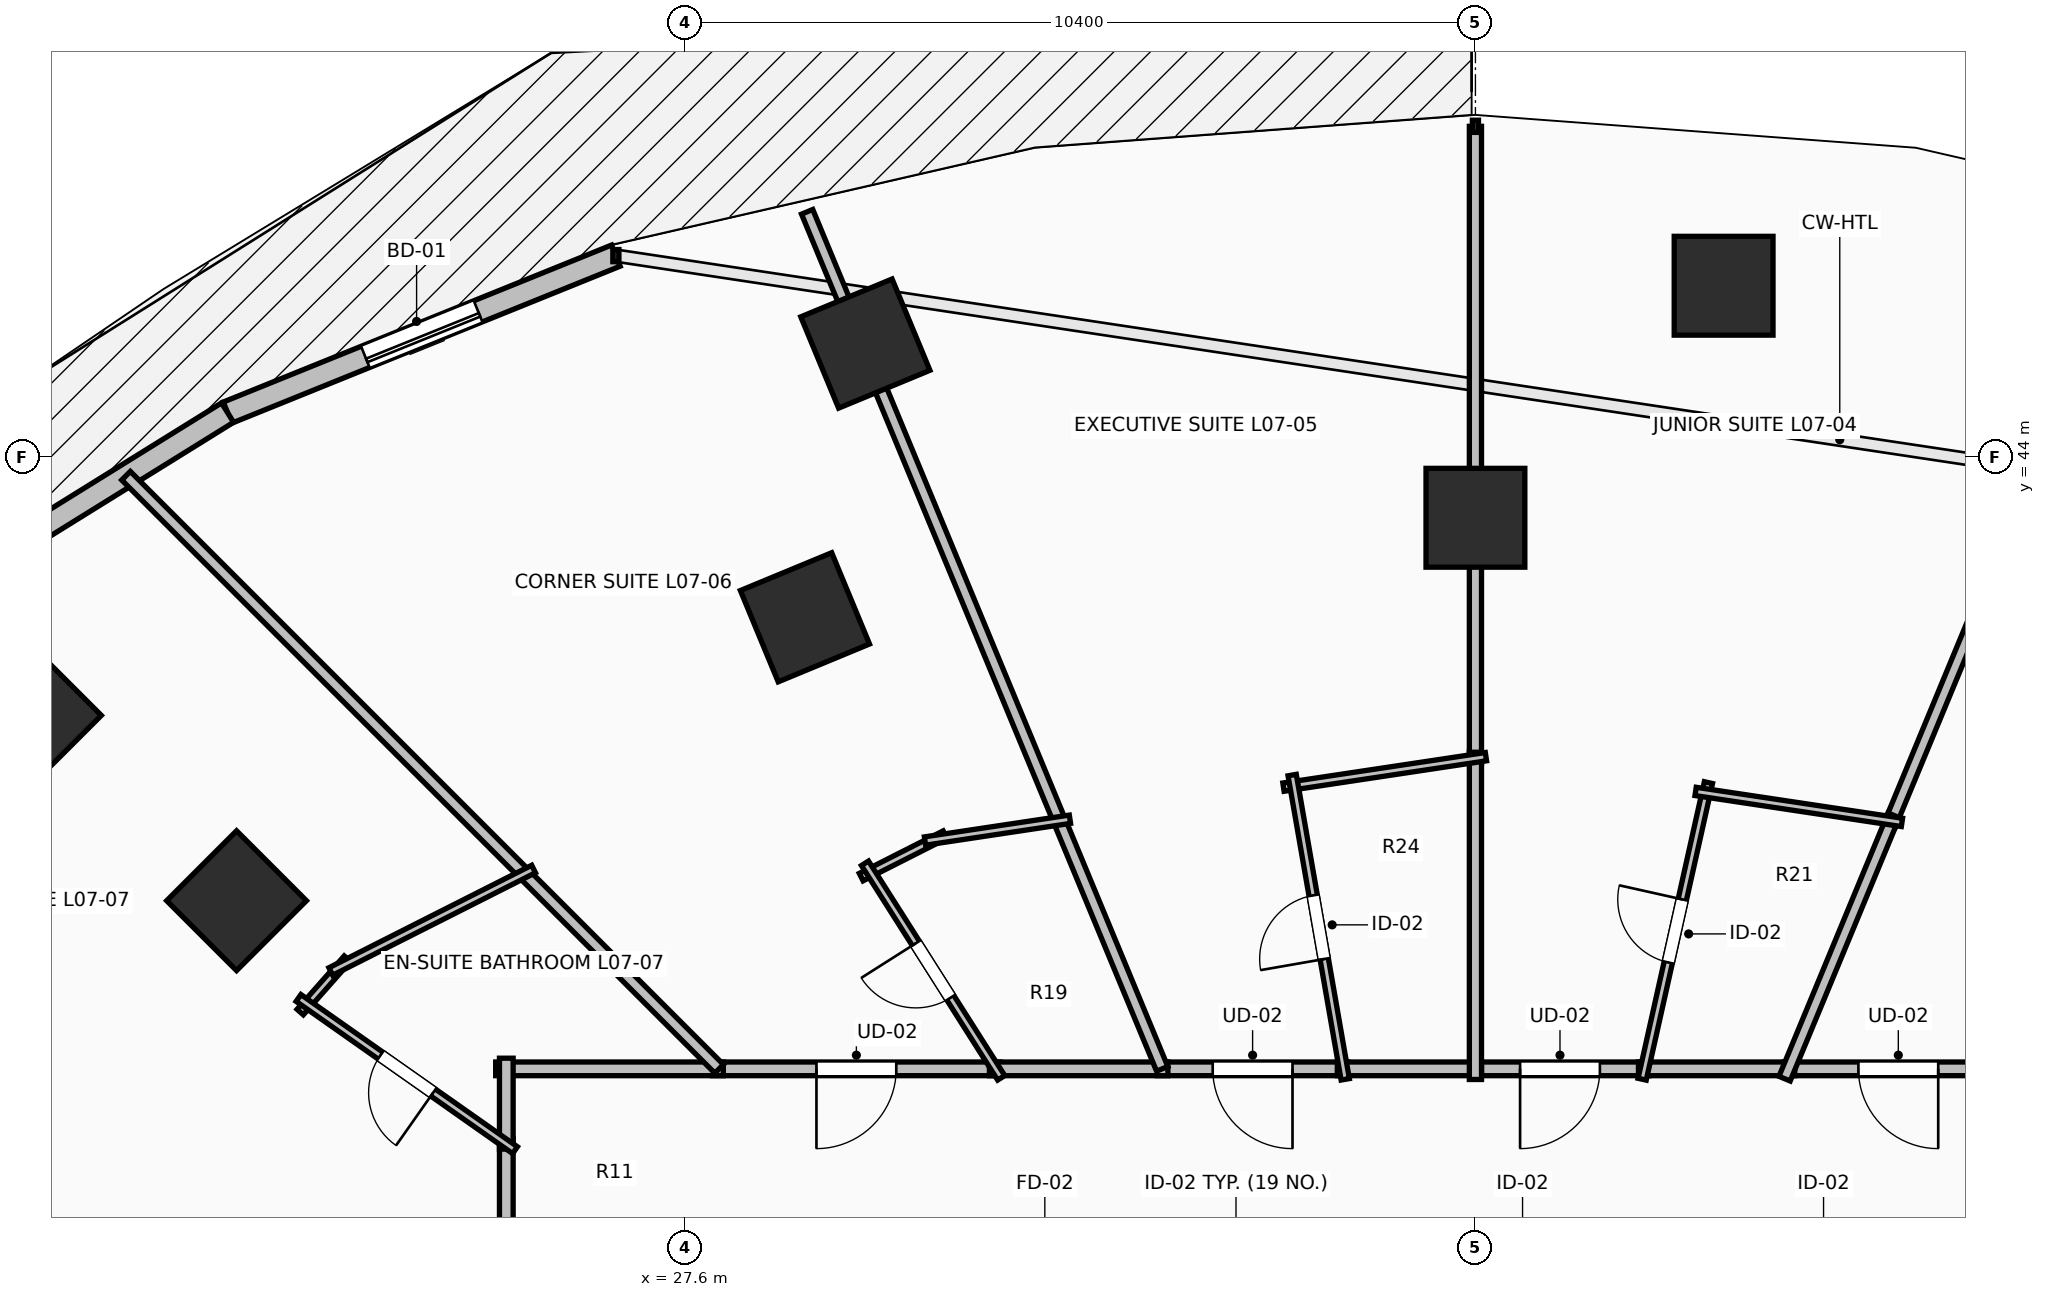
"""IFC4 building model, lengths in metres.
Left out: names, types, materials, properties, quantities, classifications, styles, units other than length and angle.
Written with IfcOpenShell. Run it as: python <this file> out.ifc"""

import sys

from ifc_helpers import new_model, si_unit, direction, frame, frame_2d, origin, origin_2d, place, context, subcontext, project, spatial, rectangle, extrude, element, fill, save


model = new_model("IFC4")
c1 = context("Model", 3, precision=1e-05, world=origin(), true_north=direction((0.0, 1.0)))
c2 = subcontext(c1, "Body", "Model", "MODEL_VIEW")
j1 = project(units=[si_unit("LENGTHUNIT", "METRE"), si_unit("PLANEANGLEUNIT", "RADIAN")], contexts=[c1])
p1 = place(None, origin())
s1 = spatial("IfcSite", under=j1, at=p1, CompositionType="ELEMENT")
p2 = place(p1, origin())
s2 = spatial("IfcBuilding", under=s1, at=p2, CompositionType="ELEMENT")
p3 = place(p2, frame((0.0, 0.0, 31.0)))
s3 = spatial("IfcBuildingStorey", under=s2, at=p3, CompositionType="ELEMENT", Elevation=31.0)
for number, where, z_axis, x_axis in (
    (1, (38.0, 43.2, 0.0), (0.0, 0.0, 1.0), (0.0, 1.0, 0.0)),
    (2, (29.179, 41.891, 0.0), (0.0, 0.0, 1.0), (-0.383, 0.924, 0.0)),
    (3, (21.701, 38.162, 0.0), (0.0, 0.0, 1.0), (-0.707, 0.707, 0.0)),
    (4, (41.265, 46.252, 0.0), (0.0, 0.0, 1.0), (0.0, 1.0, 0.0)),
    (5, (29.974, 45.492, 0.0), (0.0, 0.0, 1.0), (-0.383, 0.924, 0.0)),
    (6, (19.003, 40.6, 0.0), (0.0, 0.0, 1.0), (-0.707, 0.707, 0.0)),
):
    element("IfcColumn", number, at=place(p3, frame(where, z_axis=z_axis, x_axis=x_axis)), inside=s3, PredefinedType="COLUMN", context=c2, shape_type="SweptSolid", body=[
        extrude(rectangle(XDim=1.3, YDim=1.3, at=origin_2d()), origin(), (0.0, 0.0, 1.0), 3.5),
    ])
p4 = place(p3, frame((26.692, 46.649, 0.0), z_axis=(0.0, 0.0, 1.0), x_axis=(-0.927095325176, -0.374825636845, 0.0)))
e7 = element("IfcWall", 7, at=p4, inside=s3, PredefinedType="STANDARD", context=c2, shape_type="SweptSolid", body=[
    extrude(rectangle(XDim=5.51, YDim=0.3, at=frame_2d((2.755, 0.0))), origin(), (0.0, 0.0, 1.0), 3.24),
])
p5 = place(p4, frame((1.955, 0.0, 0.0)))
e8 = element("IfcOpeningElement", 8, at=p5, cuts=e7, PredefinedType="OPENING", context=c2, shape_type="SweptSolid", body=[
    extrude(rectangle(XDim=1.6, YDim=2.3, at=frame_2d((0.8, 1.15))), frame((0.0, 0.165, 0.0), z_axis=(0.0, -1.0, 0.0), x_axis=(1.0, 0.0, 0.0)), (0.0, 0.0, 1.0), 0.33),
])
p6 = place(p3, frame((21.583, 44.583, 0.0), z_axis=(0.0, 0.0, 1.0), x_axis=(-0.849633724826, -0.527373239404, 0.0)))
e9 = element("IfcWall", 9, at=p6, inside=s3, PredefinedType="STANDARD", context=c2, shape_type="SweptSolid", body=[
    extrude(rectangle(XDim=5.271, YDim=0.3, at=frame_2d((2.635, 0.0))), origin(), (0.0, 0.0, 1.0), 3.24),
])
p7 = place(p3, frame((45.066, 35.95, 0.0), z_axis=(0.0, 0.0, 1.0), x_axis=(-1.0, 0.0, 0.0)))
e10 = element("IfcWall", 10, at=p7, inside=s3, PredefinedType="PARTITIONING", context=c2, shape_type="SweptSolid", body=[
    extrude(rectangle(XDim=3.005, YDim=0.18, at=frame_2d((1.502, 0.0))), origin(), (0.0, 0.0, 1.0), 3.24),
])
p8 = place(p7, frame((0.978, 0.0, 0.0)))
e11 = element("IfcOpeningElement", 11, at=p8, cuts=e10, PredefinedType="OPENING", context=c2, shape_type="SweptSolid", body=[
    extrude(rectangle(XDim=1.05, YDim=2.2, at=frame_2d((0.525, 1.1))), frame((0.0, 0.105, 0.0), z_axis=(0.0, -1.0, 0.0), x_axis=(1.0, 0.0, 0.0)), (0.0, 0.0, 1.0), 0.21),
])
p9 = place(p3, frame((40.285, 35.95, 0.0), z_axis=(0.0, 0.0, 1.0), x_axis=(-1.0, 0.0, 0.0)))
e12 = element("IfcWall", 12, at=p9, inside=s3, PredefinedType="PARTITIONING", context=c2, shape_type="SweptSolid", body=[
    extrude(rectangle(XDim=2.345, YDim=0.18, at=frame_2d((1.172, 0.0))), origin(), (0.0, 0.0, 1.0), 3.24),
])
p10 = place(p9, frame((0.647, 0.0, 0.0)))
e13 = element("IfcOpeningElement", 13, at=p10, cuts=e12, PredefinedType="OPENING", context=c2, shape_type="SweptSolid", body=[
    extrude(rectangle(XDim=1.05, YDim=2.2, at=frame_2d((0.525, 1.1))), frame((0.0, 0.105, 0.0), z_axis=(0.0, -1.0, 0.0), x_axis=(1.0, 0.0, 0.0)), (0.0, 0.0, 1.0), 0.21),
])
p11 = place(p3, frame((42.201, 35.95, 0.0), z_axis=(0.0, 0.0, 1.0), x_axis=(-1.0, 0.0, 0.0)))
e14 = element("IfcWall", 14, at=p11, inside=s3, PredefinedType="PARTITIONING", context=c2, shape_type="SweptSolid", body=[
    extrude(rectangle(XDim=2.056, YDim=0.18, at=frame_2d((1.028, 0.0))), origin(), (0.0, 0.0, 1.0), 3.24),
])
p12 = place(p3, frame((36.323, 35.95, 0.0), z_axis=(0.0, 0.0, 1.0), x_axis=(-1.0, 0.0, 0.0)))
e15 = element("IfcWall", 15, at=p12, inside=s3, PredefinedType="PARTITIONING", context=c2, shape_type="SweptSolid", body=[
    extrude(rectangle(XDim=2.509, YDim=0.18, at=frame_2d((1.254, 0.0))), origin(), (0.0, 0.0, 1.0), 3.24),
])
p13 = place(p12, frame((0.729, 0.0, 0.0)))
e16 = element("IfcOpeningElement", 16, at=p13, cuts=e15, PredefinedType="OPENING", context=c2, shape_type="SweptSolid", body=[
    extrude(rectangle(XDim=1.05, YDim=2.2, at=frame_2d((0.525, 1.1))), frame((0.0, 0.105, 0.0), z_axis=(0.0, -1.0, 0.0), x_axis=(1.0, 0.0, 0.0)), (0.0, 0.0, 1.0), 0.21),
])
p14 = place(p3, frame((38.08, 35.95, 0.0), z_axis=(0.0, 0.0, 1.0), x_axis=(-1.0, 0.0, 0.0)))
e17 = element("IfcWall", 17, at=p14, inside=s3, PredefinedType="PARTITIONING", context=c2, shape_type="SweptSolid", body=[
    extrude(rectangle(XDim=1.897, YDim=0.18, at=frame_2d((0.948, 0.0))), origin(), (0.0, 0.0, 1.0), 3.24),
])
p15 = place(p3, frame((31.746, 35.95, 0.0), z_axis=(0.0, 0.0, 1.0), x_axis=(-1.0, 0.0, 0.0)))
e18 = element("IfcWall", 18, at=p15, inside=s3, PredefinedType="PARTITIONING", context=c2, shape_type="SweptSolid", body=[
    extrude(rectangle(XDim=3.781, YDim=0.18, at=frame_2d((1.891, 0.0))), origin(), (0.0, 0.0, 1.0), 2.432),
])
p16 = place(p15, frame((1.365, 0.0, 0.0)))
e19 = element("IfcOpeningElement", 19, at=p16, cuts=e18, PredefinedType="OPENING", context=c2, shape_type="SweptSolid", body=[
    extrude(rectangle(XDim=1.05, YDim=2.2, at=frame_2d((0.525, 1.1))), frame((0.0, 0.105, 0.0), z_axis=(0.0, -1.0, 0.0), x_axis=(1.0, 0.0, 0.0)), (0.0, 0.0, 1.0), 0.21),
])
p17 = place(p3, frame((33.954, 35.95, 0.0), z_axis=(0.0, 0.0, 1.0), x_axis=(-1.0, 0.0, 0.0)))
e20 = element("IfcWall", 20, at=p17, inside=s3, PredefinedType="PARTITIONING", context=c2, shape_type="SweptSolid", body=[
    extrude(rectangle(XDim=2.348, YDim=0.18, at=frame_2d((1.174, 0.0))), origin(), (0.0, 0.0, 1.0), 3.24),
])
p18 = place(p3, frame((25.25, 35.034, 0.0), z_axis=(0.0, 0.0, 1.0), x_axis=(0.0, -1.0, 0.0)))
e21 = element("IfcWall", 21, at=p18, inside=s3, PredefinedType="PARTITIONING", context=c2, shape_type="SweptSolid", body=[
    extrude(rectangle(XDim=3.813, YDim=0.18, at=frame_2d((1.906, 0.0))), origin(), (0.0, 0.0, 1.0), 2.432),
])
p19 = place(p18, frame((1.382, 0.0, 0.0)))
e22 = element("IfcOpeningElement", 22, at=p19, cuts=e21, PredefinedType="OPENING", context=c2, shape_type="SweptSolid", body=[
    extrude(rectangle(XDim=1.05, YDim=2.2, at=frame_2d((0.525, 1.1))), frame((0.0, 0.105, 0.0), z_axis=(0.0, -1.0, 0.0), x_axis=(1.0, 0.0, 0.0)), (0.0, 0.0, 1.0), 0.21),
])
p20 = place(p3, frame((28.105, 35.95, 0.0), z_axis=(0.0, 0.0, 1.0), x_axis=(-1.0, 0.0, 0.0)))
e23 = element("IfcWall", 23, at=p20, inside=s3, PredefinedType="PARTITIONING", context=c2, shape_type="SweptSolid", body=[
    extrude(rectangle(XDim=2.995, YDim=0.18, at=frame_2d((1.498, 0.0))), origin(), (0.0, 0.0, 1.0), 2.432),
])
p21 = place(p3, frame((25.25, 36.09, 0.0), z_axis=(0.0, 0.0, 1.0), x_axis=(0.0, -1.0, 0.0)))
e24 = element("IfcWall", 24, at=p21, inside=s3, PredefinedType="PARTITIONING", context=c2, shape_type="SweptSolid", body=[
    extrude(rectangle(XDim=1.196, YDim=0.18, at=frame_2d((0.598, 0.0))), origin(), (0.0, 0.0, 1.0), 2.432),
])
p22 = place(p3, frame((46.792, 47.225, 0.0), z_axis=(0.0, 0.0, 1.0), x_axis=(-0.382750893248, -0.923851586413, 0.0)))
e25 = element("IfcWall", 25, at=p22, inside=s3, PredefinedType="PARTITIONING", context=c2, shape_type="SweptSolid", body=[
    extrude(rectangle(XDim=8.734, YDim=0.16, at=frame_2d((4.367, 0.0))), origin(), (0.0, 0.0, 1.0), 2.874),
])
p23 = place(p3, frame((43.503, 39.285, 0.0), z_axis=(0.0, 0.0, 1.0), x_axis=(-0.382867331148, -0.923803337697, 0.0)))
e26 = element("IfcWall", 26, at=p23, inside=s3, PredefinedType="PARTITIONING", context=c2, shape_type="SweptSolid", body=[
    extrude(rectangle(XDim=3.75, YDim=0.16, at=frame_2d((1.875, 0.0))), origin(), (0.0, 0.0, 1.0), 2.922),
])
p24 = place(p3, frame((40.194, 35.813, 0.0), z_axis=(0.0, 0.0, 1.0), x_axis=(0.21804880916, 0.975937865248, 0.0)))
e27 = element("IfcWall", 27, at=p24, inside=s3, PredefinedType="PARTITIONING", context=c2, shape_type="SweptSolid", body=[
    extrude(rectangle(XDim=3.998, YDim=0.11, at=frame_2d((1.999, 0.0))), origin(), (0.0, 0.0, 1.0), 2.922),
])
p25 = place(p24, frame((1.574, 0.0, 0.0)))
e28 = element("IfcOpeningElement", 28, at=p25, cuts=e27, PredefinedType="OPENING", context=c2, shape_type="SweptSolid", body=[
    extrude(rectangle(XDim=0.85, YDim=2.1, at=frame_2d((0.425, 1.05))), frame((0.0, 0.07, 0.0), z_axis=(0.0, -1.0, 0.0), x_axis=(1.0, 0.0, 0.0)), (0.0, 0.0, 1.0), 0.14),
])
p26 = place(p3, frame((40.896, 39.6, 0.0), z_axis=(0.0, 0.0, 1.0), x_axis=(0.98891024541, -0.148514398367, 0.0)))
e29 = element("IfcWall", 29, at=p26, inside=s3, PredefinedType="PARTITIONING", context=c2, shape_type="SweptSolid", body=[
    extrude(rectangle(XDim=2.745, YDim=0.11, at=frame_2d((1.373, 0.0))), origin(), (0.0, 0.0, 1.0), 3.24),
])
p27 = place(p3, frame((38.0, 48.35, 0.0), z_axis=(0.0, 0.0, 1.0), x_axis=(0.0, -1.0, 0.0)))
e30 = element("IfcWall", 30, at=p27, inside=s3, PredefinedType="PARTITIONING", context=c2, shape_type="SweptSolid", body=[
    extrude(rectangle(XDim=8.375, YDim=0.16, at=frame_2d((4.188, 0.0))), origin(), (0.0, 0.0, 1.0), 2.432),
])
p28 = place(p3, frame((38.0, 40.115, 0.0), z_axis=(0.0, 0.0, 1.0), x_axis=(0.0, -1.0, 0.0)))
e31 = element("IfcWall", 31, at=p28, inside=s3, PredefinedType="PARTITIONING", context=c2, shape_type="SweptSolid", body=[
    extrude(rectangle(XDim=4.305, YDim=0.16, at=frame_2d((2.152, 0.0))), origin(), (0.0, 0.0, 1.0), 2.922),
])
p29 = place(p3, frame((35.475, 39.656, 0.0), z_axis=(0.0, 0.0, 1.0), x_axis=(0.988878442063, 0.148726012595, 0.0)))
e32 = element("IfcWall", 32, at=p29, inside=s3, PredefinedType="PARTITIONING", context=c2, shape_type="SweptSolid", body=[
    extrude(rectangle(XDim=2.694, YDim=0.11, at=frame_2d((1.347, 0.0))), origin(), (0.0, 0.0, 1.0), 3.24),
])
p30 = place(p3, frame((36.287, 35.812, 0.0), z_axis=(0.0, 0.0, 1.0), x_axis=(-0.171838135253, 0.985125197766, 0.0)))
e33 = element("IfcWall", 33, at=p30, inside=s3, PredefinedType="PARTITIONING", context=c2, shape_type="SweptSolid", body=[
    extrude(rectangle(XDim=4.063, YDim=0.11, at=frame_2d((2.032, 0.0))), origin(), (0.0, 0.0, 1.0), 2.922),
])
p31 = place(p30, frame((1.607, 0.0, 0.0)))
e34 = element("IfcOpeningElement", 34, at=p31, cuts=e33, PredefinedType="OPENING", context=c2, shape_type="SweptSolid", body=[
    extrude(rectangle(XDim=0.85, YDim=2.1, at=frame_2d((0.425, 1.05))), frame((0.0, 0.07, 0.0), z_axis=(0.0, -1.0, 0.0), x_axis=(1.0, 0.0, 0.0)), (0.0, 0.0, 1.0), 0.14),
])
p32 = place(p3, frame((29.208, 47.225, 0.0), z_axis=(0.0, 0.0, 1.0), x_axis=(0.382723985517, -0.923862733803, 0.0)))
e35 = element("IfcWall", 35, at=p32, inside=s3, PredefinedType="PARTITIONING", context=c2, shape_type="SweptSolid", body=[
    extrude(rectangle(XDim=12.204, YDim=0.16, at=frame_2d((6.102, 0.0))), origin(), (0.0, 0.0, 1.0), 2.432),
])
p33 = place(p3, frame((29.919, 38.473, 0.0), z_axis=(0.0, 0.0, 1.0), x_axis=(0.892084606746, 0.45186840386, 0.0)))
e36 = element("IfcWall", 36, at=p33, inside=s3, PredefinedType="PARTITIONING", context=c2, shape_type="SweptSolid", body=[
    extrude(rectangle(XDim=1.236, YDim=0.11, at=frame_2d((0.618, 0.0))), origin(), (0.0, 0.0, 1.0), 3.24),
])
p34 = place(p3, frame((30.759, 38.947, 0.0), z_axis=(0.0, 0.0, 1.0), x_axis=(0.988889867338, 0.148650026153, 0.0)))
e37 = element("IfcWall", 37, at=p34, inside=s3, PredefinedType="PARTITIONING", context=c2, shape_type="SweptSolid", body=[
    extrude(rectangle(XDim=1.928, YDim=0.11, at=frame_2d((0.964, 0.0))), origin(), (0.0, 0.0, 1.0), 3.24),
])
p35 = place(p3, frame((31.761, 35.832, 0.0), z_axis=(0.0, 0.0, 1.0), x_axis=(-0.535991614842, 0.844223305067, 0.0)))
e38 = element("IfcWall", 38, at=p35, inside=s3, PredefinedType="PARTITIONING", context=c2, shape_type="SweptSolid", body=[
    extrude(rectangle(XDim=3.343, YDim=0.11, at=frame_2d((1.672, 0.0))), origin(), (0.0, 0.0, 1.0), 2.432),
])
p36 = place(p35, frame((1.247, 0.0, 0.0)))
e39 = element("IfcOpeningElement", 39, at=p36, cuts=e38, PredefinedType="OPENING", context=c2, shape_type="SweptSolid", body=[
    extrude(rectangle(XDim=0.85, YDim=2.1, at=frame_2d((0.425, 1.05))), frame((0.0, 0.07, 0.0), z_axis=(0.0, -1.0, 0.0), x_axis=(1.0, 0.0, 0.0)), (0.0, 0.0, 1.0), 0.14),
])
p37 = place(p3, frame((20.247, 43.753, 0.0), z_axis=(0.0, 0.0, 1.0), x_axis=(0.707106781187, -0.707106781187, 0.0)))
e40 = element("IfcWall", 40, at=p37, inside=s3, PredefinedType="PARTITIONING", context=c2, shape_type="SweptSolid", body=[
    extrude(rectangle(XDim=11.035, YDim=0.16, at=frame_2d((5.518, 0.0))), origin(), (0.0, 0.0, 1.0), 2.432),
])
p38 = place(p3, frame((22.538, 36.697, 0.0), z_axis=(0.0, 0.0, 1.0), x_axis=(0.662242037053, 0.749289986827, 0.0)))
e41 = element("IfcWall", 41, at=p38, inside=s3, PredefinedType="PARTITIONING", context=c2, shape_type="SweptSolid", body=[
    extrude(rectangle(XDim=0.937, YDim=0.11, at=frame_2d((0.468, 0.0))), origin(), (0.0, 0.0, 1.0), 2.432),
])
p39 = place(p3, frame((22.941, 37.231, 0.0), z_axis=(0.0, 0.0, 1.0), x_axis=(0.892507731149, 0.451032094024, 0.0)))
e42 = element("IfcWall", 42, at=p39, inside=s3, PredefinedType="PARTITIONING", context=c2, shape_type="SweptSolid", body=[
    extrude(rectangle(XDim=2.989, YDim=0.11, at=frame_2d((1.495, 0.0))), origin(), (0.0, 0.0, 1.0), 2.432),
])
p40 = place(p3, frame((25.365, 34.881, 0.0), z_axis=(0.0, 0.0, 1.0), x_axis=(-0.81809360258, 0.575085087111, 0.0)))
e43 = element("IfcWall", 43, at=p40, inside=s3, PredefinedType="PARTITIONING", context=c2, shape_type="SweptSolid", body=[
    extrude(rectangle(XDim=3.481, YDim=0.11, at=frame_2d((1.741, 0.0))), origin(), (0.0, 0.0, 1.0), 2.432),
])
p41 = place(p40, frame((1.316, 0.0, 0.0)))
e44 = element("IfcOpeningElement", 44, at=p41, cuts=e43, PredefinedType="OPENING", context=c2, shape_type="SweptSolid", body=[
    extrude(rectangle(XDim=0.85, YDim=2.1, at=frame_2d((0.425, 1.05))), frame((0.0, 0.07, 0.0), z_axis=(0.0, -1.0, 0.0), x_axis=(1.0, 0.0, 0.0)), (0.0, 0.0, 1.0), 0.14),
])
p42 = place(p3, frame((12.207, 36.684, 0.0), z_axis=(0.0, 0.0, 1.0), x_axis=(0.923876032578, -0.382691881842, 0.0)))
e45 = element("IfcWall", 45, at=p42, inside=s3, PredefinedType="PARTITIONING", context=c2, shape_type="SweptSolid", body=[
    extrude(rectangle(XDim=10.63, YDim=0.16, at=frame_2d((5.315, 0.0))), origin(), (0.0, 0.0, 1.0), 2.624),
])
p43 = place(p5, origin())
e46 = element("IfcDoor", 46, at=p43, inside=s3, OperationType="SLIDING_TO_LEFT", PredefinedType="DOOR", context=c2, shape_type="SweptSolid", body=[
    extrude(rectangle(XDim=1.6, YDim=2.3, at=frame_2d((0.8, 1.15))), frame((0.0, 0.025, 0.0), z_axis=(0.0, -1.0, 0.0), x_axis=(1.0, 0.0, 0.0)), (0.0, 0.0, 1.0), 0.05),
])
fill(e8, e46)
p44 = place(p8, origin())
e47 = element("IfcDoor", 47, at=p44, inside=s3, OperationType="SINGLE_SWING_LEFT", PredefinedType="DOOR", context=c2, shape_type="SweptSolid", body=[
    extrude(rectangle(XDim=1.05, YDim=2.2, at=frame_2d((0.525, 1.1))), frame((0.0, 0.025, 0.0), z_axis=(0.0, -1.0, 0.0), x_axis=(1.0, 0.0, 0.0)), (0.0, 0.0, 1.0), 0.05),
])
fill(e11, e47)
p45 = place(p10, origin())
e48 = element("IfcDoor", 48, at=p45, inside=s3, OperationType="SINGLE_SWING_RIGHT", PredefinedType="DOOR", context=c2, shape_type="SweptSolid", body=[
    extrude(rectangle(XDim=1.05, YDim=2.2, at=frame_2d((0.525, 1.1))), frame((0.0, 0.025, 0.0), z_axis=(0.0, -1.0, 0.0), x_axis=(1.0, 0.0, 0.0)), (0.0, 0.0, 1.0), 0.05),
])
fill(e13, e48)
p46 = place(p13, origin())
e49 = element("IfcDoor", 49, at=p46, inside=s3, OperationType="SINGLE_SWING_LEFT", PredefinedType="DOOR", context=c2, shape_type="SweptSolid", body=[
    extrude(rectangle(XDim=1.05, YDim=2.2, at=frame_2d((0.525, 1.1))), frame((0.0, 0.025, 0.0), z_axis=(0.0, -1.0, 0.0), x_axis=(1.0, 0.0, 0.0)), (0.0, 0.0, 1.0), 0.05),
])
fill(e16, e49)
p47 = place(p16, origin())
e50 = element("IfcDoor", 50, at=p47, inside=s3, OperationType="SINGLE_SWING_RIGHT", PredefinedType="DOOR", context=c2, shape_type="SweptSolid", body=[
    extrude(rectangle(XDim=1.05, YDim=2.2, at=frame_2d((0.525, 1.1))), frame((0.0, 0.025, 0.0), z_axis=(0.0, -1.0, 0.0), x_axis=(1.0, 0.0, 0.0)), (0.0, 0.0, 1.0), 0.05),
])
fill(e19, e50)
p48 = place(p25, origin())
e51 = element("IfcDoor", 51, at=p48, inside=s3, OperationType="SINGLE_SWING_RIGHT", PredefinedType="DOOR", context=c2, shape_type="SweptSolid", body=[
    extrude(rectangle(XDim=0.85, YDim=2.1, at=frame_2d((0.425, 1.05))), frame((0.0, 0.025, 0.0), z_axis=(0.0, -1.0, 0.0), x_axis=(1.0, 0.0, 0.0)), (0.0, 0.0, 1.0), 0.05),
])
fill(e28, e51)
p49 = place(p31, origin())
e52 = element("IfcDoor", 52, at=p49, inside=s3, OperationType="SINGLE_SWING_LEFT", PredefinedType="DOOR", context=c2, shape_type="SweptSolid", body=[
    extrude(rectangle(XDim=0.85, YDim=2.1, at=frame_2d((0.425, 1.05))), frame((0.0, 0.025, 0.0), z_axis=(0.0, -1.0, 0.0), x_axis=(1.0, 0.0, 0.0)), (0.0, 0.0, 1.0), 0.05),
])
fill(e34, e52)
p50 = place(p36, origin())
e53 = element("IfcDoor", 53, at=p50, inside=s3, OperationType="SINGLE_SWING_RIGHT", PredefinedType="DOOR", context=c2, shape_type="SweptSolid", body=[
    extrude(rectangle(XDim=0.85, YDim=2.1, at=frame_2d((0.425, 1.05))), frame((0.0, 0.025, 0.0), z_axis=(0.0, -1.0, 0.0), x_axis=(1.0, 0.0, 0.0)), (0.0, 0.0, 1.0), 0.05),
])
fill(e39, e53)
p51 = place(p41, origin())
e54 = element("IfcDoor", 54, at=p51, inside=s3, OperationType="SINGLE_SWING_LEFT", PredefinedType="DOOR", context=c2, shape_type="SweptSolid", body=[
    extrude(rectangle(XDim=0.85, YDim=2.1, at=frame_2d((0.425, 1.05))), frame((0.0, 0.025, 0.0), z_axis=(0.0, -1.0, 0.0), x_axis=(1.0, 0.0, 0.0)), (0.0, 0.0, 1.0), 0.05),
])
fill(e44, e54)
save(model, sys.argv[1])
